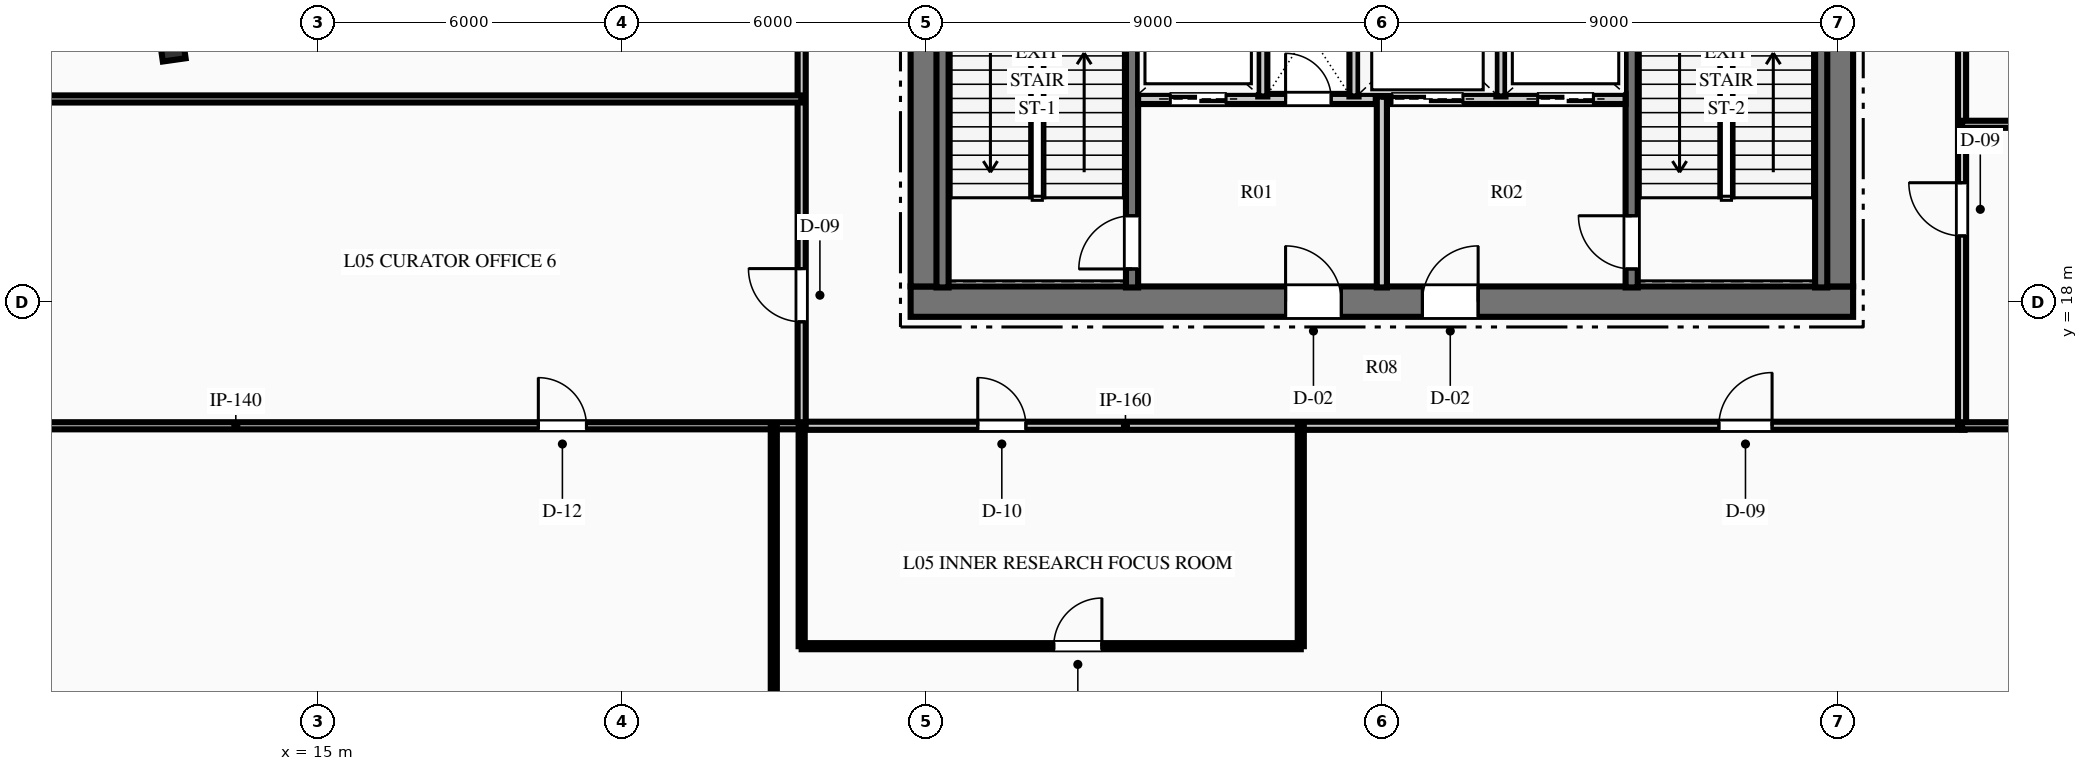
"""IFC4 building model, lengths in metres.
Left out: names, types, materials, properties, quantities, classifications, styles, units other than length and angle.
Written with IfcOpenShell. Run it as: python <this file> out.ifc"""

import sys

from ifc_helpers import new_model, si_unit, direction, frame, frame_2d, origin, origin_2d, place, context, subcontext, project, spatial, rectangle, i_section, extrude, element, fill, save


model = new_model("IFC4")
c1 = context("Model", 3, precision=1e-05, world=origin(), true_north=direction((0.0, 1.0)))
c2 = subcontext(c1, "Body", "Model", "MODEL_VIEW")
j1 = project(units=[si_unit("LENGTHUNIT", "METRE"), si_unit("PLANEANGLEUNIT", "RADIAN")], contexts=[c1])
p1 = place(None, origin())
s1 = spatial("IfcSite", under=j1, at=p1, CompositionType="ELEMENT")
p2 = place(p1, origin())
s2 = spatial("IfcBuilding", under=s1, at=p2, CompositionType="ELEMENT")
p3 = place(p2, frame((0.0, 0.0, 28.2)))
s3 = spatial("IfcBuildingStorey", under=s2, at=p3, CompositionType="ELEMENT", Elevation=28.2)
p4 = place(p3, frame((26.7, 18.0, 0.0), z_axis=(0.0, 0.0, 1.0), x_axis=(1.0, 0.0, 0.0)))
e1 = element("IfcWall", 1, at=p4, inside=s3, PredefinedType="SHEAR", context=c2, shape_type="SweptSolid", body=[
    extrude(rectangle(XDim=18.6, YDim=0.6, at=frame_2d((9.3, 0.0))), origin(), (0.0, 0.0, 1.0), 4.5),
])
p5 = place(p4, frame((7.4, 0.0, 0.0)))
e2 = element("IfcOpeningElement", 2, at=p5, cuts=e1, PredefinedType="OPENING", context=c2, shape_type="SweptSolid", body=[
    extrude(rectangle(XDim=1.1, YDim=2.15, at=frame_2d((0.55, 1.075))), frame((0.0, 0.31, 0.0), z_axis=(0.0, -1.0, 0.0), x_axis=(1.0, 0.0, 0.0)), (0.0, 0.0, 1.0), 0.62),
])
p6 = place(p4, frame((10.1, 0.0, 0.0)))
e3 = element("IfcOpeningElement", 3, at=p6, cuts=e1, PredefinedType="OPENING", context=c2, shape_type="SweptSolid", body=[
    extrude(rectangle(XDim=1.1, YDim=2.15, at=frame_2d((0.55, 1.075))), frame((0.0, 0.31, 0.0), z_axis=(0.0, -1.0, 0.0), x_axis=(1.0, 0.0, 0.0)), (0.0, 0.0, 1.0), 0.62),
])
p7 = place(p3, frame((27.0, 18.3, 0.0), z_axis=(0.0, 0.0, 1.0), x_axis=(0.0, 1.0, 0.0)))
e4 = element("IfcWall", 4, at=p7, inside=s3, PredefinedType="SHEAR", context=c2, shape_type="SweptSolid", body=[
    extrude(rectangle(XDim=15.4, YDim=0.6, at=frame_2d((7.7, 0.0))), origin(), (0.0, 0.0, 1.0), 4.5),
])
p8 = place(p7, frame((9.94, 0.0, 0.0)))
e5 = element("IfcOpeningElement", 5, at=p8, cuts=e4, PredefinedType="OPENING", context=c2, shape_type="SweptSolid", body=[
    extrude(rectangle(XDim=1.4, YDim=2.2, at=frame_2d((0.7, 1.1))), frame((0.0, 0.31, 0.0), z_axis=(0.0, -1.0, 0.0), x_axis=(1.0, 0.0, 0.0)), (0.0, 0.0, 1.0), 0.62),
])
p9 = place(p3, frame((45.0, 18.3, 0.0), z_axis=(0.0, 0.0, 1.0), x_axis=(0.0, 1.0, 0.0)))
e6 = element("IfcWall", 6, at=p9, inside=s3, PredefinedType="SHEAR", context=c2, shape_type="SweptSolid", body=[
    extrude(rectangle(XDim=15.4, YDim=0.6, at=frame_2d((7.7, 0.0))), origin(), (0.0, 0.0, 1.0), 4.5),
])
p10 = place(p9, frame((9.94, 0.0, 0.0)))
e7 = element("IfcOpeningElement", 7, at=p10, cuts=e6, PredefinedType="OPENING", context=c2, shape_type="SweptSolid", body=[
    extrude(rectangle(XDim=1.4, YDim=2.2, at=frame_2d((0.7, 1.1))), frame((0.0, 0.31, 0.0), z_axis=(0.0, -1.0, 0.0), x_axis=(1.0, 0.0, 0.0)), (0.0, 0.0, 1.0), 0.62),
])
p11 = place(p3, frame((31.07, 18.28, 0.0), z_axis=(0.0, 0.0, 1.0), x_axis=(0.0, 1.0, 0.0)))
e8 = element("IfcWall", 8, at=p11, inside=s3, PredefinedType="SHEAR", context=c2, shape_type="SweptSolid", body=[
    extrude(rectangle(XDim=8.26, YDim=0.24, at=frame_2d((4.13, 0.0))), origin(), (0.0, 0.0, 1.0), 4.5),
])
p12 = place(p11, frame((0.365, 0.0, 0.0)))
e9 = element("IfcOpeningElement", 9, at=p12, cuts=e8, PredefinedType="OPENING", context=c2, shape_type="SweptSolid", body=[
    extrude(rectangle(XDim=1.05, YDim=2.15, at=frame_2d((0.525, 1.075))), frame((0.0, 0.13, 0.0), z_axis=(0.0, -1.0, 0.0), x_axis=(1.0, 0.0, 0.0)), (0.0, 0.0, 1.0), 0.26),
])
p13 = place(p3, frame((27.33, 18.28, 0.0), z_axis=(0.0, 0.0, 1.0), x_axis=(0.0, 1.0, 0.0)))
e10 = element("IfcWall", 10, at=p13, inside=s3, PredefinedType="SHEAR", context=c2, shape_type="SweptSolid", body=[
    extrude(rectangle(XDim=8.26, YDim=0.24, at=frame_2d((4.13, 0.0))), origin(), (0.0, 0.0, 1.0), 4.5),
])
p14 = place(p3, frame((40.93, 18.28, 0.0), z_axis=(0.0, 0.0, 1.0), x_axis=(0.0, 1.0, 0.0)))
e11 = element("IfcWall", 11, at=p14, inside=s3, PredefinedType="SHEAR", context=c2, shape_type="SweptSolid", body=[
    extrude(rectangle(XDim=8.26, YDim=0.24, at=frame_2d((4.13, 0.0))), origin(), (0.0, 0.0, 1.0), 4.5),
])
p15 = place(p14, frame((0.365, 0.0, 0.0)))
e12 = element("IfcOpeningElement", 12, at=p15, cuts=e11, PredefinedType="OPENING", context=c2, shape_type="SweptSolid", body=[
    extrude(rectangle(XDim=1.05, YDim=2.15, at=frame_2d((0.525, 1.075))), frame((0.0, 0.13, 0.0), z_axis=(0.0, -1.0, 0.0), x_axis=(1.0, 0.0, 0.0)), (0.0, 0.0, 1.0), 0.26),
])
p16 = place(p3, frame((44.67, 18.28, 0.0), z_axis=(0.0, 0.0, 1.0), x_axis=(0.0, 1.0, 0.0)))
e13 = element("IfcWall", 13, at=p16, inside=s3, PredefinedType="SHEAR", context=c2, shape_type="SweptSolid", body=[
    extrude(rectangle(XDim=8.26, YDim=0.24, at=frame_2d((4.13, 0.0))), origin(), (0.0, 0.0, 1.0), 4.5),
])
p17 = place(p3, frame((12.127, 23.053, 0.0), z_axis=(0.0, 0.0, 1.0), x_axis=(0.990146240249, 0.140037219771, 0.0)))
e14 = element("IfcColumn", 14, at=p17, inside=s3, PredefinedType="COLUMN", context=c2, shape_type="SweptSolid", body=[
    extrude(i_section(OverallWidth=0.454, OverallDepth=0.569, WebThickness=0.078, FlangeThickness=0.125, at=origin_2d()), origin(), (0.0, 0.0, 1.0), 4.5),
])
p18 = place(p3, frame((36.0, 18.28, 0.0), z_axis=(0.0, 0.0, 1.0), x_axis=(0.0, 1.0, 0.0)))
e15 = element("IfcWall", 15, at=p18, inside=s3, PredefinedType="PARTITIONING", context=c2, shape_type="SweptSolid", body=[
    extrude(rectangle(XDim=3.77, YDim=0.2, at=frame_2d((1.885, 0.0))), origin(), (0.0, 0.0, 1.0), 4.19),
])
p19 = place(p3, frame((31.19, 22.0, 0.0), z_axis=(0.0, 0.0, 1.0), x_axis=(1.0, 0.0, 0.0)))
e16 = element("IfcWall", 16, at=p19, inside=s3, PredefinedType="PARTITIONING", context=c2, shape_type="SweptSolid", body=[
    extrude(rectangle(XDim=4.69, YDim=0.2, at=frame_2d((2.345, 0.0))), origin(), (0.0, 0.0, 1.0), 4.19),
])
p20 = place(p19, frame((2.91, 0.0, 0.0)))
e17 = element("IfcOpeningElement", 17, at=p20, cuts=e16, PredefinedType="OPENING", context=c2, shape_type="SweptSolid", body=[
    extrude(rectangle(XDim=0.9, YDim=2.15, at=frame_2d((0.45, 1.075))), frame((0.0, 0.11, 0.0), z_axis=(0.0, -1.0, 0.0), x_axis=(1.0, 0.0, 0.0)), (0.0, 0.0, 1.0), 0.22),
])
p21 = place(p19, frame((0.635, 0.0, 0.0)))
e18 = element("IfcOpeningElement", 18, at=p21, cuts=e16, PredefinedType="OPENING", context=c2, shape_type="SweptSolid", body=[
    extrude(rectangle(XDim=1.1, YDim=2.15, at=frame_2d((0.55, 1.075))), frame((0.0, 0.11, 0.0), z_axis=(0.0, -1.0, 0.0), x_axis=(1.0, 0.0, 0.0)), (0.0, 0.0, 1.0), 0.22),
])
p22 = place(p3, frame((36.12, 22.0, 0.0), z_axis=(0.0, 0.0, 1.0), x_axis=(1.0, 0.0, 0.0)))
e19 = element("IfcWall", 19, at=p22, inside=s3, PredefinedType="PARTITIONING", context=c2, shape_type="SweptSolid", body=[
    extrude(rectangle(XDim=4.69, YDim=0.2, at=frame_2d((2.345, 0.0))), origin(), (0.0, 0.0, 1.0), 4.19),
])
p23 = place(p22, frame((2.955, 0.0, 0.0)))
e20 = element("IfcOpeningElement", 20, at=p23, cuts=e19, PredefinedType="OPENING", context=c2, shape_type="SweptSolid", body=[
    extrude(rectangle(XDim=1.1, YDim=2.15, at=frame_2d((0.55, 1.075))), frame((0.0, 0.11, 0.0), z_axis=(0.0, -1.0, 0.0), x_axis=(1.0, 0.0, 0.0)), (0.0, 0.0, 1.0), 0.22),
])
p24 = place(p22, frame((0.08, 0.0, 0.0)))
e21 = element("IfcOpeningElement", 21, at=p24, cuts=e19, PredefinedType="OPENING", context=c2, shape_type="SweptSolid", body=[
    extrude(rectangle(XDim=1.4, YDim=2.2, at=frame_2d((0.7, 1.1))), frame((0.0, 0.11, 0.0), z_axis=(0.0, -1.0, 0.0), x_axis=(1.0, 0.0, 0.0)), (0.0, 0.0, 1.0), 0.22),
])
for number, where, z_axis, x_axis in (
    (22, (33.65, 22.05, 0.0), (0.0, 0.0, 1.0), (0.0, 1.0, 0.0)),
    (23, (35.45, 22.05, 0.0), (0.0, 0.0, 1.0), (0.0, 1.0, 0.0)),
    (24, (38.35, 22.05, 0.0), (0.0, 0.0, 1.0), (0.0, 1.0, 0.0)),
):
    element("IfcWall", number, at=place(p3, frame(where, z_axis=z_axis, x_axis=x_axis)), inside=s3, PredefinedType="PARTITIONING", context=c2, shape_type="SweptSolid", body=[
        extrude(rectangle(XDim=2.6, YDim=0.18, at=frame_2d((1.3, 0.0))), origin(), (0.0, 0.0, 1.0), 4.19),
    ])
p25 = place(p3, frame((24.5, 15.55, 0.0), z_axis=(0.0, 0.0, 1.0), x_axis=(1.0, 0.0, 0.0)))
e25 = element("IfcWall", 25, at=p25, inside=s3, PredefinedType="PARTITIONING", context=c2, shape_type="SweptSolid", body=[
    extrude(rectangle(XDim=23.0, YDim=0.16, at=frame_2d((11.5, 0.0))), origin(), (0.0, 0.0, 1.0), 4.19),
])
p26 = place(p25, frame((3.525, 0.0, 0.0)))
e26 = element("IfcOpeningElement", 26, at=p26, cuts=e25, PredefinedType="OPENING", context=c2, shape_type="SweptSolid", body=[
    extrude(rectangle(XDim=0.95, YDim=2.15, at=frame_2d((0.475, 1.075))), frame((0.0, 0.09, 0.0), z_axis=(0.0, -1.0, 0.0), x_axis=(1.0, 0.0, 0.0)), (0.0, 0.0, 1.0), 0.18),
])
p27 = place(p25, frame((18.151, 0.0, 0.0)))
e27 = element("IfcOpeningElement", 27, at=p27, cuts=e25, PredefinedType="OPENING", context=c2, shape_type="SweptSolid", body=[
    extrude(rectangle(XDim=1.05, YDim=2.15, at=frame_2d((0.525, 1.075))), frame((0.0, 0.09, 0.0), z_axis=(0.0, -1.0, 0.0), x_axis=(1.0, 0.0, 0.0)), (0.0, 0.0, 1.0), 0.18),
])
p28 = place(p3, frame((24.55, 15.55, 0.0), z_axis=(0.0, 0.0, 1.0), x_axis=(0.0, 1.0, 0.0)))
e28 = element("IfcWall", 28, at=p28, inside=s3, PredefinedType="PARTITIONING", context=c2, shape_type="SweptSolid", body=[
    extrude(rectangle(XDim=20.9, YDim=0.16, at=frame_2d((10.45, 0.0))), origin(), (0.0, 0.0, 1.0), 4.19),
])
p29 = place(p28, frame((2.052, 0.0, 0.0)))
e29 = element("IfcOpeningElement", 29, at=p29, cuts=e28, PredefinedType="OPENING", context=c2, shape_type="SweptSolid", body=[
    extrude(rectangle(XDim=1.05, YDim=2.15, at=frame_2d((0.525, 1.075))), frame((0.0, 0.09, 0.0), z_axis=(0.0, -1.0, 0.0), x_axis=(1.0, 0.0, 0.0)), (0.0, 0.0, 1.0), 0.18),
])
p30 = place(p28, frame((15.645, 0.0, 0.0)))
e30 = element("IfcOpeningElement", 30, at=p30, cuts=e28, PredefinedType="OPENING", context=c2, shape_type="SweptSolid", body=[
    extrude(rectangle(XDim=1.05, YDim=2.15, at=frame_2d((0.525, 1.075))), frame((0.0, 0.09, 0.0), z_axis=(0.0, -1.0, 0.0), x_axis=(1.0, 0.0, 0.0)), (0.0, 0.0, 1.0), 0.18),
])
p31 = place(p3, frame((47.45, 15.55, 0.0), z_axis=(0.0, 0.0, 1.0), x_axis=(0.0, 1.0, 0.0)))
e31 = element("IfcWall", 31, at=p31, inside=s3, PredefinedType="PARTITIONING", context=c2, shape_type="SweptSolid", body=[
    extrude(rectangle(XDim=20.9, YDim=0.16, at=frame_2d((10.45, 0.0))), origin(), (0.0, 0.0, 1.0), 4.19),
])
p32 = place(p31, frame((3.747, 0.0, 0.0)))
e32 = element("IfcOpeningElement", 32, at=p32, cuts=e31, PredefinedType="OPENING", context=c2, shape_type="SweptSolid", body=[
    extrude(rectangle(XDim=1.05, YDim=2.15, at=frame_2d((0.525, 1.075))), frame((0.0, 0.09, 0.0), z_axis=(0.0, -1.0, 0.0), x_axis=(1.0, 0.0, 0.0)), (0.0, 0.0, 1.0), 0.18),
])
p33 = place(p31, frame((7.865, 0.0, 0.0)))
e33 = element("IfcOpeningElement", 33, at=p33, cuts=e31, PredefinedType="OPENING", context=c2, shape_type="SweptSolid", body=[
    extrude(rectangle(XDim=1.05, YDim=2.15, at=frame_2d((0.525, 1.075))), frame((0.0, 0.09, 0.0), z_axis=(0.0, -1.0, 0.0), x_axis=(1.0, 0.0, 0.0)), (0.0, 0.0, 1.0), 0.18),
])
p34 = place(p31, frame((18.045, 0.0, 0.0)))
e34 = element("IfcOpeningElement", 34, at=p34, cuts=e31, PredefinedType="OPENING", context=c2, shape_type="SweptSolid", body=[
    extrude(rectangle(XDim=1.05, YDim=2.15, at=frame_2d((0.525, 1.075))), frame((0.0, 0.09, 0.0), z_axis=(0.0, -1.0, 0.0), x_axis=(1.0, 0.0, 0.0)), (0.0, 0.0, 1.0), 0.18),
])
p35 = place(p3, frame((9.04, 15.55, 0.0), z_axis=(0.0, 0.0, 1.0), x_axis=(1.0, 0.0, 0.0)))
e35 = element("IfcWall", 35, at=p35, inside=s3, PredefinedType="PARTITIONING", context=c2, shape_type="SweptSolid", body=[
    extrude(rectangle(XDim=15.51, YDim=0.14, at=frame_2d((7.755, 0.0))), origin(), (0.0, 0.0, 1.0), 4.19),
])
p36 = place(p35, frame((10.313, 0.0, 0.0)))
e36 = element("IfcOpeningElement", 36, at=p36, cuts=e35, PredefinedType="OPENING", context=c2, shape_type="SweptSolid", body=[
    extrude(rectangle(XDim=0.95, YDim=2.15, at=frame_2d((0.475, 1.075))), frame((0.0, 0.08, 0.0), z_axis=(0.0, -1.0, 0.0), x_axis=(1.0, 0.0, 0.0)), (0.0, 0.0, 1.0), 0.16),
])
p37 = place(p3, frame((47.45, 15.55, 0.0), z_axis=(0.0, 0.0, 1.0), x_axis=(1.0, 0.0, 0.0)))
e37 = element("IfcWall", 37, at=p37, inside=s3, PredefinedType="PARTITIONING", context=c2, shape_type="SweptSolid", body=[
    extrude(rectangle(XDim=15.51, YDim=0.14, at=frame_2d((7.755, 0.0))), origin(), (0.0, 0.0, 1.0), 4.19),
])
p38 = place(p3, frame((24.0, 1.04, 0.0), z_axis=(0.0, 0.0, 1.0), x_axis=(0.0, 1.0, 0.0)))
e38 = element("IfcWall", 38, at=p38, inside=s3, PredefinedType="PARTITIONING", context=c2, shape_type="SweptSolid", body=[
    extrude(rectangle(XDim=14.51, YDim=0.12, at=frame_2d((7.255, 0.0))), origin(), (0.0, 0.0, 1.0), 4.19),
])
for number, where, z_axis, x_axis in (
    (39, (9.04, 22.0, 0.0), (0.0, 0.0, 1.0), (1.0, 0.0, 0.0)),
    (40, (47.45, 21.5, 0.0), (0.0, 0.0, 1.0), (1.0, 0.0, 0.0)),
):
    element("IfcWall", number, at=place(p3, frame(where, z_axis=z_axis, x_axis=x_axis)), inside=s3, PredefinedType="PARTITIONING", context=c2, shape_type="SweptSolid", body=[
        extrude(rectangle(XDim=15.51, YDim=0.14, at=frame_2d((7.755, 0.0))), origin(), (0.0, 0.0, 1.0), 4.19),
    ])
p39 = place(p3, frame((24.55, 11.2, 0.0), z_axis=(0.0, 0.0, 1.0), x_axis=(0.0, 1.0, 0.0)))
e41 = element("IfcWall", 41, at=p39, inside=s3, PredefinedType="PARTITIONING", context=c2, shape_type="SweptSolid", body=[
    extrude(rectangle(XDim=4.35, YDim=0.12, at=frame_2d((2.175, 0.0))), origin(), (0.0, 0.0, 1.0), 4.19),
])
p40 = place(p3, frame((24.55, 11.2, 0.0), z_axis=(0.0, 0.0, 1.0), x_axis=(1.0, 0.0, 0.0)))
e42 = element("IfcWall", 42, at=p40, inside=s3, PredefinedType="PARTITIONING", context=c2, shape_type="SweptSolid", body=[
    extrude(rectangle(XDim=9.85, YDim=0.12, at=frame_2d((4.925, 0.0))), origin(), (0.0, 0.0, 1.0), 4.19),
])
p41 = place(p40, frame((4.975, 0.0, 0.0)))
e43 = element("IfcOpeningElement", 43, at=p41, cuts=e42, PredefinedType="OPENING", context=c2, shape_type="SweptSolid", body=[
    extrude(rectangle(XDim=0.95, YDim=2.15, at=frame_2d((0.475, 1.075))), frame((0.0, 0.07, 0.0), z_axis=(0.0, -1.0, 0.0), x_axis=(1.0, 0.0, 0.0)), (0.0, 0.0, 1.0), 0.14),
])
p42 = place(p3, frame((34.4, 11.2, 0.0), z_axis=(0.0, 0.0, 1.0), x_axis=(0.0, 1.0, 0.0)))
e44 = element("IfcWall", 44, at=p42, inside=s3, PredefinedType="PARTITIONING", context=c2, shape_type="SweptSolid", body=[
    extrude(rectangle(XDim=4.35, YDim=0.12, at=frame_2d((2.175, 0.0))), origin(), (0.0, 0.0, 1.0), 4.19),
])
p43 = place(p12, origin())
e45 = element("IfcDoor", 45, at=p43, inside=s3, OperationType="SINGLE_SWING_LEFT", PredefinedType="DOOR", context=c2, shape_type="SweptSolid", body=[
    extrude(rectangle(XDim=1.05, YDim=2.15, at=frame_2d((0.525, 1.075))), frame((0.0, 0.025, 0.0), z_axis=(0.0, -1.0, 0.0), x_axis=(1.0, 0.0, 0.0)), (0.0, 0.0, 1.0), 0.05),
])
fill(e9, e45)
p44 = place(p15, origin())
e46 = element("IfcDoor", 46, at=p44, inside=s3, OperationType="SINGLE_SWING_RIGHT", PredefinedType="DOOR", context=c2, shape_type="SweptSolid", body=[
    extrude(rectangle(XDim=1.05, YDim=2.15, at=frame_2d((0.525, 1.075))), frame((0.0, 0.025, 0.0), z_axis=(0.0, -1.0, 0.0), x_axis=(1.0, 0.0, 0.0)), (0.0, 0.0, 1.0), 0.05),
])
fill(e12, e46)
p45 = place(p5, origin())
e47 = element("IfcDoor", 47, at=p45, inside=s3, OperationType="SINGLE_SWING_LEFT", PredefinedType="DOOR", context=c2, shape_type="SweptSolid", body=[
    extrude(rectangle(XDim=1.1, YDim=2.15, at=frame_2d((0.55, 1.075))), frame((0.0, 0.025, 0.0), z_axis=(0.0, -1.0, 0.0), x_axis=(1.0, 0.0, 0.0)), (0.0, 0.0, 1.0), 0.05),
])
fill(e2, e47)
p46 = place(p6, origin())
e48 = element("IfcDoor", 48, at=p46, inside=s3, OperationType="SINGLE_SWING_RIGHT", PredefinedType="DOOR", context=c2, shape_type="SweptSolid", body=[
    extrude(rectangle(XDim=1.1, YDim=2.15, at=frame_2d((0.55, 1.075))), frame((0.0, 0.025, 0.0), z_axis=(0.0, -1.0, 0.0), x_axis=(1.0, 0.0, 0.0)), (0.0, 0.0, 1.0), 0.05),
])
fill(e3, e48)
p47 = place(p20, origin())
e49 = element("IfcDoor", 49, at=p47, inside=s3, OperationType="SINGLE_SWING_LEFT", PredefinedType="DOOR", context=c2, shape_type="SweptSolid", body=[
    extrude(rectangle(XDim=0.9, YDim=2.15, at=frame_2d((0.45, 1.075))), frame((0.0, 0.025, 0.0), z_axis=(0.0, -1.0, 0.0), x_axis=(1.0, 0.0, 0.0)), (0.0, 0.0, 1.0), 0.05),
])
fill(e17, e49)
p48 = place(p26, origin())
e50 = element("IfcDoor", 50, at=p48, inside=s3, OperationType="SINGLE_SWING_LEFT", PredefinedType="DOOR", context=c2, shape_type="SweptSolid", body=[
    extrude(rectangle(XDim=0.95, YDim=2.15, at=frame_2d((0.475, 1.075))), frame((0.0, 0.025, 0.0), z_axis=(0.0, -1.0, 0.0), x_axis=(1.0, 0.0, 0.0)), (0.0, 0.0, 1.0), 0.05),
])
fill(e26, e50)
p49 = place(p41, origin())
e51 = element("IfcDoor", 51, at=p49, inside=s3, OperationType="SINGLE_SWING_RIGHT", PredefinedType="DOOR", context=c2, shape_type="SweptSolid", body=[
    extrude(rectangle(XDim=0.95, YDim=2.15, at=frame_2d((0.475, 1.075))), frame((0.0, 0.025, 0.0), z_axis=(0.0, -1.0, 0.0), x_axis=(1.0, 0.0, 0.0)), (0.0, 0.0, 1.0), 0.05),
])
fill(e43, e51)
p50 = place(p36, origin())
e52 = element("IfcDoor", 52, at=p50, inside=s3, OperationType="SINGLE_SWING_LEFT", PredefinedType="DOOR", context=c2, shape_type="SweptSolid", body=[
    extrude(rectangle(XDim=0.95, YDim=2.15, at=frame_2d((0.475, 1.075))), frame((0.0, 0.025, 0.0), z_axis=(0.0, -1.0, 0.0), x_axis=(1.0, 0.0, 0.0)), (0.0, 0.0, 1.0), 0.05),
])
fill(e36, e52)
p51 = place(p27, origin())
e53 = element("IfcDoor", 53, at=p51, inside=s3, OperationType="SINGLE_SWING_RIGHT", PredefinedType="DOOR", context=c2, shape_type="SweptSolid", body=[
    extrude(rectangle(XDim=1.05, YDim=2.15, at=frame_2d((0.525, 1.075))), frame((0.0, 0.025, 0.0), z_axis=(0.0, -1.0, 0.0), x_axis=(1.0, 0.0, 0.0)), (0.0, 0.0, 1.0), 0.05),
])
fill(e27, e53)
p52 = place(p29, origin())
e54 = element("IfcDoor", 54, at=p52, inside=s3, OperationType="SINGLE_SWING_RIGHT", PredefinedType="DOOR", context=c2, shape_type="SweptSolid", body=[
    extrude(rectangle(XDim=1.05, YDim=2.15, at=frame_2d((0.525, 1.075))), frame((0.0, 0.025, 0.0), z_axis=(0.0, -1.0, 0.0), x_axis=(1.0, 0.0, 0.0)), (0.0, 0.0, 1.0), 0.05),
])
fill(e29, e54)
p53 = place(p32, origin())
e55 = element("IfcDoor", 55, at=p53, inside=s3, OperationType="SINGLE_SWING_RIGHT", PredefinedType="DOOR", context=c2, shape_type="SweptSolid", body=[
    extrude(rectangle(XDim=1.05, YDim=2.15, at=frame_2d((0.525, 1.075))), frame((0.0, 0.025, 0.0), z_axis=(0.0, -1.0, 0.0), x_axis=(1.0, 0.0, 0.0)), (0.0, 0.0, 1.0), 0.05),
])
fill(e32, e55)
p54 = place(p21, origin())
e56 = element("IfcDoor", 56, at=p54, inside=s3, OperationType="SLIDING_TO_LEFT", PredefinedType="DOOR", context=c2, shape_type="SweptSolid", body=[
    extrude(rectangle(XDim=1.1, YDim=2.15, at=frame_2d((0.55, 1.075))), frame((0.0, 0.025, 0.0), z_axis=(0.0, -1.0, 0.0), x_axis=(1.0, 0.0, 0.0)), (0.0, 0.0, 1.0), 0.05),
])
fill(e18, e56)
p55 = place(p23, origin())
e57 = element("IfcDoor", 57, at=p55, inside=s3, OperationType="SLIDING_TO_LEFT", PredefinedType="DOOR", context=c2, shape_type="SweptSolid", body=[
    extrude(rectangle(XDim=1.1, YDim=2.15, at=frame_2d((0.55, 1.075))), frame((0.0, 0.025, 0.0), z_axis=(0.0, -1.0, 0.0), x_axis=(1.0, 0.0, 0.0)), (0.0, 0.0, 1.0), 0.05),
])
fill(e20, e57)
p56 = place(p24, origin())
e58 = element("IfcDoor", 58, at=p56, inside=s3, OperationType="SLIDING_TO_LEFT", PredefinedType="DOOR", context=c2, shape_type="SweptSolid", body=[
    extrude(rectangle(XDim=1.4, YDim=2.2, at=frame_2d((0.7, 1.1))), frame((0.0, 0.025, 0.0), z_axis=(0.0, -1.0, 0.0), x_axis=(1.0, 0.0, 0.0)), (0.0, 0.0, 1.0), 0.05),
])
fill(e21, e58)
save(model, sys.argv[1])
